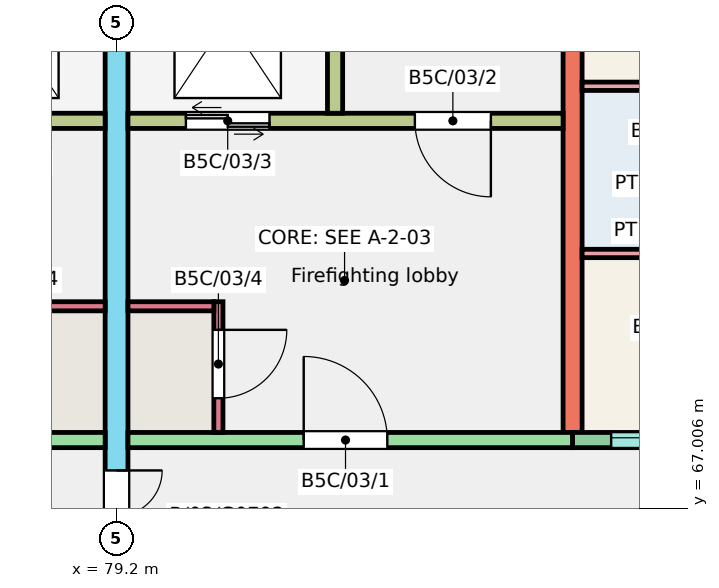
"""IFC4 building model, lengths in metres.
Left out: names, types, materials, properties, quantities, classifications, styles, units other than length and angle.
Written with IfcOpenShell. Run it as: python <this file> out.ifc"""

import sys

from ifc_helpers import new_model, si_unit, direction, frame, frame_2d, origin, place, context, subcontext, project, spatial, rectangle, extrude, element, fill, save


model = new_model("IFC4")
c1 = context("Model", 3, precision=1e-05, world=origin(), true_north=direction((0.0, 1.0)))
c2 = subcontext(c1, "Body", "Model", "MODEL_VIEW")
j1 = project(units=[si_unit("LENGTHUNIT", "METRE"), si_unit("PLANEANGLEUNIT", "RADIAN")], contexts=[c1])
p1 = place(None, origin())
s1 = spatial("IfcSite", under=j1, at=p1, CompositionType="ELEMENT")
p2 = place(p1, origin())
s2 = spatial("IfcBuilding", under=s1, at=p2, CompositionType="ELEMENT")
p3 = place(p2, frame((0.0, 0.0, 9.0)))
s3 = spatial("IfcBuildingStorey", under=s2, at=p3, CompositionType="ELEMENT", Elevation=9.0)
p4 = place(p3, frame((79.2, 66.0, 0.0), z_axis=(0.0, 0.0, 1.0), x_axis=(0.0, 1.0, 0.0)))
e1 = element("IfcWall", 1, at=p4, inside=s3, PredefinedType="SHEAR", context=c2, shape_type="SweptSolid", body=[
    extrude(rectangle(XDim=11.0, YDim=0.3, at=frame_2d((5.5, 0.0))), origin(), (0.0, 0.0, 1.0), 3.0),
])
p5 = place(p4, frame((0.3, 0.0, 0.0)))
e2 = element("IfcOpeningElement", 2, at=p5, cuts=e1, PredefinedType="OPENING", context=c2, shape_type="SweptSolid", body=[
    extrude(rectangle(XDim=1.2, YDim=2.1, at=frame_2d((0.6, 1.05))), frame((0.0, 0.16, 0.0), z_axis=(0.0, -1.0, 0.0), x_axis=(1.0, 0.0, 0.0)), (0.0, 0.0, 1.0), 0.32),
])
p6 = place(p3, frame((85.2, 68.0, 0.0), z_axis=(0.0, 0.0, 1.0), x_axis=(0.0, 1.0, 0.0)))
e3 = element("IfcWall", 3, at=p6, inside=s3, PredefinedType="SHEAR", context=c2, shape_type="SweptSolid", body=[
    extrude(rectangle(XDim=9.0, YDim=0.25, at=frame_2d((4.5, 0.0))), origin(), (0.0, 0.0, 1.0), 3.0),
])
p7 = place(p3, frame((73.2, 67.9, 0.0), z_axis=(0.0, 0.0, 1.0), x_axis=(1.0, 0.0, 0.0)))
e4 = element("IfcWall", 4, at=p7, inside=s3, PredefinedType="SHEAR", context=c2, shape_type="SweptSolid", body=[
    extrude(rectangle(XDim=5.85, YDim=0.2, at=frame_2d((2.925, 0.0))), origin(), (0.0, 0.0, 1.0), 3.0),
])
p8 = place(p7, frame((2.438, 0.0, 0.0)))
e5 = element("IfcOpeningElement", 5, at=p8, cuts=e4, PredefinedType="OPENING", context=c2, shape_type="SweptSolid", body=[
    extrude(rectangle(XDim=1.1, YDim=2.1, at=frame_2d((0.55, 1.05))), frame((0.0, 0.11, 0.0), z_axis=(0.0, -1.0, 0.0), x_axis=(1.0, 0.0, 0.0)), (0.0, 0.0, 1.0), 0.22),
])
p9 = place(p3, frame((73.325, 72.1, 0.0), z_axis=(0.0, 0.0, 1.0), x_axis=(1.0, 0.0, 0.0)))
e6 = element("IfcWall", 6, at=p9, inside=s3, PredefinedType="SHEAR", context=c2, shape_type="SweptSolid", body=[
    extrude(rectangle(XDim=5.725, YDim=0.2, at=frame_2d((2.863, 0.0))), origin(), (0.0, 0.0, 1.0), 3.0),
])
p10 = place(p9, frame((0.95, 0.0, 0.0)))
e7 = element("IfcOpeningElement", 7, at=p10, cuts=e6, PredefinedType="OPENING", context=c2, shape_type="SweptSolid", body=[
    extrude(rectangle(XDim=1.0, YDim=2.1, at=frame_2d((0.5, 1.05))), frame((0.0, 0.11, 0.0), z_axis=(0.0, -1.0, 0.0), x_axis=(1.0, 0.0, 0.0)), (0.0, 0.0, 1.0), 0.22),
])
p11 = place(p9, frame((3.863, 0.0, 0.0)))
e8 = element("IfcOpeningElement", 8, at=p11, cuts=e6, PredefinedType="OPENING", context=c2, shape_type="SweptSolid", body=[
    extrude(rectangle(XDim=1.1, YDim=2.1, at=frame_2d((0.55, 1.05))), frame((0.0, 0.11, 0.0), z_axis=(0.0, -1.0, 0.0), x_axis=(1.0, 0.0, 0.0)), (0.0, 0.0, 1.0), 0.22),
])
p12 = place(p3, frame((77.92, 69.66, 0.0), z_axis=(0.0, 0.0, 1.0), x_axis=(1.0, 0.0, 0.0)))
e9 = element("IfcWall", 9, at=p12, inside=s3, PredefinedType="SHEAR", context=c2, shape_type="SweptSolid", body=[
    extrude(rectangle(XDim=1.13, YDim=0.12, at=frame_2d((0.565, 0.0))), origin(), (0.0, 0.0, 1.0), 3.0),
])
p13 = place(p3, frame((79.35, 67.9, 0.0), z_axis=(0.0, 0.0, 1.0), x_axis=(1.0, 0.0, 0.0)))
e10 = element("IfcWall", 10, at=p13, inside=s3, PredefinedType="SHEAR", context=c2, shape_type="SweptSolid", body=[
    extrude(rectangle(XDim=5.85, YDim=0.2, at=frame_2d((2.925, 0.0))), origin(), (0.0, 0.0, 1.0), 3.0),
])
p14 = place(p13, frame((2.312, 0.0, 0.0)))
e11 = element("IfcOpeningElement", 11, at=p14, cuts=e10, PredefinedType="OPENING", context=c2, shape_type="SweptSolid", body=[
    extrude(rectangle(XDim=1.1, YDim=2.1, at=frame_2d((0.55, 1.05))), frame((0.0, 0.11, 0.0), z_axis=(0.0, -1.0, 0.0), x_axis=(1.0, 0.0, 0.0)), (0.0, 0.0, 1.0), 0.22),
])
p15 = place(p3, frame((79.35, 72.1, 0.0), z_axis=(0.0, 0.0, 1.0), x_axis=(1.0, 0.0, 0.0)))
e12 = element("IfcWall", 12, at=p15, inside=s3, PredefinedType="SHEAR", context=c2, shape_type="SweptSolid", body=[
    extrude(rectangle(XDim=5.725, YDim=0.2, at=frame_2d((2.862, 0.0))), origin(), (0.0, 0.0, 1.0), 3.0),
])
p16 = place(p15, frame((3.775, 0.0, 0.0)))
e13 = element("IfcOpeningElement", 13, at=p16, cuts=e12, PredefinedType="OPENING", context=c2, shape_type="SweptSolid", body=[
    extrude(rectangle(XDim=1.0, YDim=2.1, at=frame_2d((0.5, 1.05))), frame((0.0, 0.11, 0.0), z_axis=(0.0, -1.0, 0.0), x_axis=(1.0, 0.0, 0.0)), (0.0, 0.0, 1.0), 0.22),
])
p17 = place(p15, frame((0.762, 0.0, 0.0)))
e14 = element("IfcOpeningElement", 14, at=p17, cuts=e12, PredefinedType="OPENING", context=c2, shape_type="SweptSolid", body=[
    extrude(rectangle(XDim=1.1, YDim=2.1, at=frame_2d((0.55, 1.05))), frame((0.0, 0.11, 0.0), z_axis=(0.0, -1.0, 0.0), x_axis=(1.0, 0.0, 0.0)), (0.0, 0.0, 1.0), 0.22),
])
p18 = place(p3, frame((82.075, 72.2, 0.0), z_axis=(0.0, 0.0, 1.0), x_axis=(0.0, 1.0, 0.0)))
e15 = element("IfcWall", 15, at=p18, inside=s3, PredefinedType="SHEAR", context=c2, shape_type="SweptSolid", body=[
    extrude(rectangle(XDim=4.8, YDim=0.2, at=frame_2d((2.4, 0.0))), origin(), (0.0, 0.0, 1.0), 3.0),
])
p19 = place(p3, frame((80.54, 68.0, 0.0), z_axis=(0.0, 0.0, 1.0), x_axis=(0.0, 1.0, 0.0)))
e16 = element("IfcWall", 16, at=p19, inside=s3, PredefinedType="SHEAR", context=c2, shape_type="SweptSolid", body=[
    extrude(rectangle(XDim=1.72, YDim=0.12, at=frame_2d((0.86, 0.0))), origin(), (0.0, 0.0, 1.0), 3.0),
])
p20 = place(p19, frame((0.45, 0.0, 0.0)))
e17 = element("IfcOpeningElement", 17, at=p20, cuts=e16, PredefinedType="OPENING", context=c2, shape_type="SweptSolid", body=[
    extrude(rectangle(XDim=0.9, YDim=2.1, at=frame_2d((0.45, 1.05))), frame((0.0, 0.07, 0.0), z_axis=(0.0, -1.0, 0.0), x_axis=(1.0, 0.0, 0.0)), (0.0, 0.0, 1.0), 0.14),
])
p21 = place(p3, frame((79.35, 69.66, 0.0), z_axis=(0.0, 0.0, 1.0), x_axis=(1.0, 0.0, 0.0)))
e18 = element("IfcWall", 18, at=p21, inside=s3, PredefinedType="SHEAR", context=c2, shape_type="SweptSolid", body=[
    extrude(rectangle(XDim=1.13, YDim=0.12, at=frame_2d((0.565, 0.0))), origin(), (0.0, 0.0, 1.0), 3.0),
])
p22 = place(p3, frame((85.2, 67.9, 0.0), z_axis=(0.0, 0.0, 1.0), x_axis=(1.0, 0.0, 0.0)))
e19 = element("IfcWall", 19, at=p22, inside=s3, PredefinedType="SOLIDWALL", context=c2, shape_type="SweptSolid", body=[
    extrude(rectangle(XDim=3.6, YDim=0.2, at=frame_2d((1.8, 0.0))), origin(), (0.0, 0.0, 1.0), 3.0),
])
p23 = place(p22, frame((0.508, 0.0, 1.1)))
e20 = element("IfcOpeningElement", 20, at=p23, cuts=e19, PredefinedType="OPENING", context=c2, shape_type="SweptSolid", body=[
    extrude(rectangle(XDim=1.2, YDim=1.3, at=frame_2d((0.6, 0.65))), frame((0.0, 0.11, 0.0), z_axis=(0.0, -1.0, 0.0), x_axis=(1.0, 0.0, 0.0)), (0.0, 0.0, 1.0), 0.22),
])
p24 = place(p22, frame((2.35, 0.0, 0.0)))
e21 = element("IfcOpeningElement", 21, at=p24, cuts=e19, PredefinedType="OPENING", context=c2, shape_type="SweptSolid", body=[
    extrude(rectangle(XDim=1.0, YDim=2.1, at=frame_2d((0.5, 1.05))), frame((0.0, 0.11, 0.0), z_axis=(0.0, -1.0, 0.0), x_axis=(1.0, 0.0, 0.0)), (0.0, 0.0, 1.0), 0.22),
])
p25 = place(p3, frame((85.325, 70.355, 0.0), z_axis=(0.0, 0.0, 1.0), x_axis=(1.0, 0.0, 0.0)))
e22 = element("IfcWall", 22, at=p25, inside=s3, PredefinedType="PARTITIONING", context=c2, shape_type="SweptSolid", body=[
    extrude(rectangle(XDim=1.965, YDim=0.11, at=frame_2d((0.982, 0.0))), origin(), (0.0, 0.0, 1.0), 2.8),
])
p26 = place(p3, frame((85.325, 72.555, 0.0), z_axis=(0.0, 0.0, 1.0), x_axis=(1.0, 0.0, 0.0)))
e23 = element("IfcWall", 23, at=p26, inside=s3, PredefinedType="PARTITIONING", context=c2, shape_type="SweptSolid", body=[
    extrude(rectangle(XDim=3.375, YDim=0.11, at=frame_2d((1.688, 0.0))), origin(), (0.0, 0.0, 1.0), 2.8),
])
p27 = place(p26, frame((2.275, 0.0, 0.0)))
e24 = element("IfcOpeningElement", 24, at=p27, cuts=e23, PredefinedType="OPENING", context=c2, shape_type="SweptSolid", body=[
    extrude(rectangle(XDim=0.9, YDim=2.1, at=frame_2d((0.45, 1.05))), frame((0.0, 0.065, 0.0), z_axis=(0.0, -1.0, 0.0), x_axis=(1.0, 0.0, 0.0)), (0.0, 0.0, 1.0), 0.13),
])
p28 = place(p23, origin())
e25 = element("IfcWindow", 25, at=p28, inside=s3, PartitioningType="SINGLE_PANEL", PredefinedType="WINDOW", context=c2, shape_type="SweptSolid", body=[
    extrude(rectangle(XDim=1.2, YDim=1.3, at=frame_2d((0.6, 0.65))), frame((0.0, 0.06, 0.0), z_axis=(0.0, -1.0, 0.0), x_axis=(1.0, 0.0, 0.0)), (0.0, 0.0, 1.0), 0.06),
])
fill(e20, e25)
p29 = place(p14, origin())
e26 = element("IfcDoor", 26, at=p29, inside=s3, OperationType="SINGLE_SWING_LEFT", PredefinedType="DOOR", context=c2, shape_type="SweptSolid", body=[
    extrude(rectangle(XDim=1.1, YDim=2.1, at=frame_2d((0.55, 1.05))), frame((0.0, 0.025, 0.0), z_axis=(0.0, -1.0, 0.0), x_axis=(1.0, 0.0, 0.0)), (0.0, 0.0, 1.0), 0.05),
])
fill(e11, e26)
p30 = place(p16, origin())
e27 = element("IfcDoor", 27, at=p30, inside=s3, OperationType="SINGLE_SWING_RIGHT", PredefinedType="DOOR", context=c2, shape_type="SweptSolid", body=[
    extrude(rectangle(XDim=1.0, YDim=2.1, at=frame_2d((0.5, 1.05))), frame((0.0, 0.025, 0.0), z_axis=(0.0, -1.0, 0.0), x_axis=(1.0, 0.0, 0.0)), (0.0, 0.0, 1.0), 0.05),
])
fill(e13, e27)
p31 = place(p17, origin())
e28 = element("IfcDoor", 28, at=p31, inside=s3, OperationType="DOUBLE_DOOR_SLIDING", PredefinedType="DOOR", context=c2, shape_type="SweptSolid", body=[
    extrude(rectangle(XDim=1.1, YDim=2.1, at=frame_2d((0.55, 1.05))), frame((0.0, 0.025, 0.0), z_axis=(0.0, -1.0, 0.0), x_axis=(1.0, 0.0, 0.0)), (0.0, 0.0, 1.0), 0.05),
])
fill(e14, e28)
p32 = place(p20, origin())
e29 = element("IfcDoor", 29, at=p32, inside=s3, OperationType="SINGLE_SWING_RIGHT", PredefinedType="DOOR", context=c2, shape_type="SweptSolid", body=[
    extrude(rectangle(XDim=0.9, YDim=2.1, at=frame_2d((0.45, 1.05))), frame((0.0, 0.025, 0.0), z_axis=(0.0, -1.0, 0.0), x_axis=(1.0, 0.0, 0.0)), (0.0, 0.0, 1.0), 0.05),
])
fill(e17, e29)
p33 = place(p5, origin())
e30 = element("IfcDoor", 30, at=p33, inside=s3, OperationType="DOUBLE_DOOR_SINGLE_SWING", PredefinedType="DOOR", context=c2, shape_type="SweptSolid", body=[
    extrude(rectangle(XDim=1.2, YDim=2.1, at=frame_2d((0.6, 1.05))), frame((0.0, 0.025, 0.0), z_axis=(0.0, -1.0, 0.0), x_axis=(1.0, 0.0, 0.0)), (0.0, 0.0, 1.0), 0.05),
])
fill(e2, e30)
save(model, sys.argv[1])
